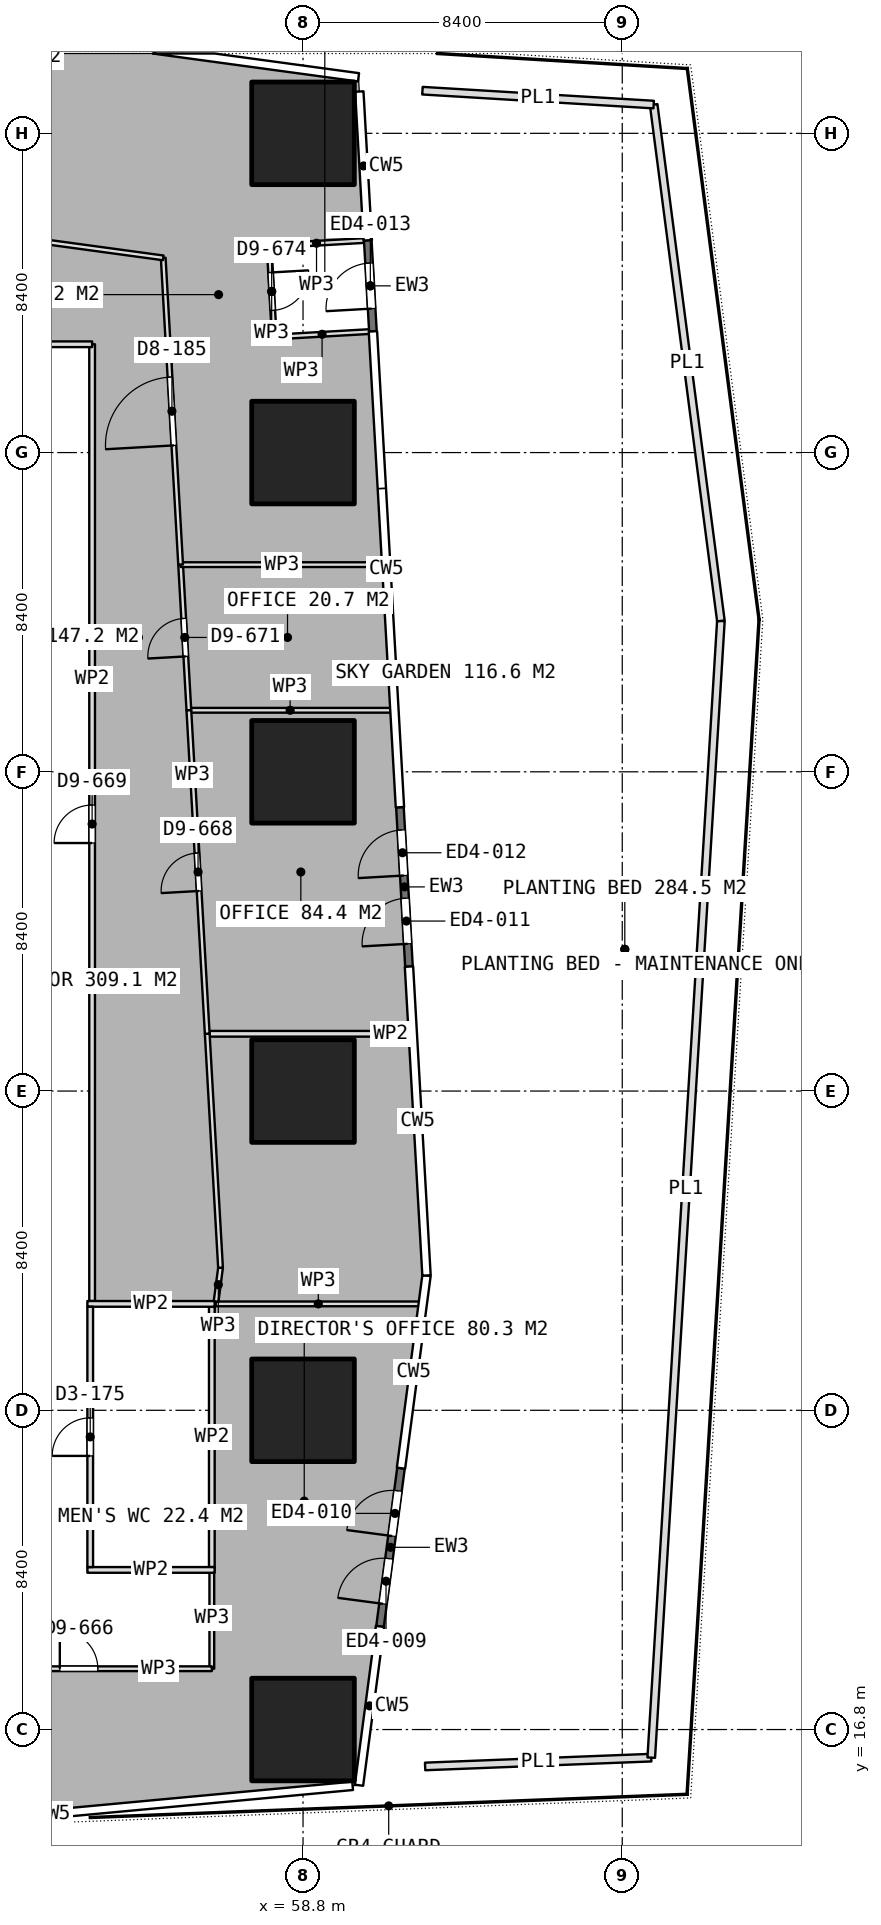
"""IFC4 building model, lengths in metres.
Left out: names, types, materials, properties, quantities, classifications, styles, units other than length and angle.
Written with IfcOpenShell. Run it as: python <this file> out.ifc"""

import sys

from ifc_helpers import new_model, si_unit, direction, frame, frame_2d, origin, origin_2d, place, context, subcontext, project, spatial, rectangle, extrude, element, fill, save


model = new_model("IFC4")
c1 = context("Model", 3, precision=1e-05, world=origin(), true_north=direction((0.0, 1.0)))
c2 = subcontext(c1, "Body", "Model", "MODEL_VIEW")
j1 = project(units=[si_unit("LENGTHUNIT", "METRE"), si_unit("PLANEANGLEUNIT", "RADIAN")], contexts=[c1])
p1 = place(None, origin())
s1 = spatial("IfcSite", under=j1, at=p1, CompositionType="ELEMENT")
p2 = place(p1, origin())
s2 = spatial("IfcBuilding", under=s1, at=p2, CompositionType="ELEMENT")
p3 = place(p2, frame((0.0, 0.0, 168.2)))
s3 = spatial("IfcBuildingStorey", under=s2, at=p3, CompositionType="ELEMENT", Elevation=168.2)
for number, where, z_axis, x_axis in (
    (1, (58.8, 16.8, 0.0), (0.0, 0.0, 1.0), (1.0, 0.0, 0.0)),
    (2, (58.8, 25.2, 0.0), (0.0, 0.0, 1.0), (1.0, 0.0, 0.0)),
    (3, (58.8, 33.6, 0.0), (0.0, 0.0, 1.0), (1.0, 0.0, 0.0)),
    (4, (58.8, 42.0, 0.0), (0.0, 0.0, 1.0), (1.0, 0.0, 0.0)),
    (5, (58.8, 50.4, 0.0), (0.0, 0.0, 1.0), (1.0, 0.0, 0.0)),
    (6, (58.8, 58.8, 0.0), (0.0, 0.0, 1.0), (1.0, 0.0, 0.0)),
):
    element("IfcColumn", number, at=place(p3, frame(where, z_axis=z_axis, x_axis=x_axis)), inside=s3, PredefinedType="COLUMN", context=c2, shape_type="SweptSolid", body=[
        extrude(rectangle(XDim=2.7, YDim=2.7, at=origin_2d()), origin(), (0.0, 0.0, 1.0), 4.5),
    ])
p4 = place(p3, frame((60.826, 19.513, 0.0), z_axis=(0.0, 0.0, 1.0), x_axis=(0.131307007814, 0.991341752222, 0.0)))
e7 = element("IfcWall", 7, at=p4, inside=s3, PredefinedType="SOLIDWALL", context=c2, shape_type="SweptSolid", body=[
    extrude(rectangle(XDim=4.2, YDim=0.2, at=frame_2d((2.1, 0.0))), origin(), (0.0, 0.0, 1.0), 4.25),
])
p5 = place(p4, frame((0.6, 0.0, 0.0)))
e8 = element("IfcOpeningElement", 8, at=p5, cuts=e7, PredefinedType="OPENING", context=c2, shape_type="SweptSolid", body=[
    extrude(rectangle(XDim=1.2, YDim=2.4, at=frame_2d((0.6, 1.2))), frame((0.0, 0.11, 0.0), z_axis=(0.0, -1.0, 0.0), x_axis=(1.0, 0.0, 0.0)), (0.0, 0.0, 1.0), 0.22),
])
p6 = place(p4, frame((2.4, 0.0, 0.0)))
e9 = element("IfcOpeningElement", 9, at=p6, cuts=e7, PredefinedType="OPENING", context=c2, shape_type="SweptSolid", body=[
    extrude(rectangle(XDim=1.2, YDim=2.4, at=frame_2d((0.6, 1.2))), frame((0.0, 0.11, 0.0), z_axis=(0.0, -1.0, 0.0), x_axis=(1.0, 0.0, 0.0)), (0.0, 0.0, 1.0), 0.22),
])
p7 = place(p3, frame((61.588, 36.875, 0.0), z_axis=(0.0, 0.0, 1.0), x_axis=(-0.056674017107, 0.998392736244, 0.0)))
e10 = element("IfcWall", 10, at=p7, inside=s3, PredefinedType="SOLIDWALL", context=c2, shape_type="SweptSolid", body=[
    extrude(rectangle(XDim=4.2, YDim=0.2, at=frame_2d((2.1, 0.0))), origin(), (0.0, 0.0, 1.0), 4.25),
])
p8 = place(p7, frame((0.6, 0.0, 0.0)))
e11 = element("IfcOpeningElement", 11, at=p8, cuts=e10, PredefinedType="OPENING", context=c2, shape_type="SweptSolid", body=[
    extrude(rectangle(XDim=1.2, YDim=2.4, at=frame_2d((0.6, 1.2))), frame((0.0, 0.11, 0.0), z_axis=(0.0, -1.0, 0.0), x_axis=(1.0, 0.0, 0.0)), (0.0, 0.0, 1.0), 0.22),
])
p9 = place(p7, frame((2.4, 0.0, 0.0)))
e12 = element("IfcOpeningElement", 12, at=p9, cuts=e10, PredefinedType="OPENING", context=c2, shape_type="SweptSolid", body=[
    extrude(rectangle(XDim=1.2, YDim=2.4, at=frame_2d((0.6, 1.2))), frame((0.0, 0.11, 0.0), z_axis=(0.0, -1.0, 0.0), x_axis=(1.0, 0.0, 0.0)), (0.0, 0.0, 1.0), 0.22),
])
p10 = place(p3, frame((60.639, 53.589, 0.0), z_axis=(0.0, 0.0, 1.0), x_axis=(-0.056658709935, 0.998393605042, 0.0)))
e13 = element("IfcWall", 13, at=p10, inside=s3, PredefinedType="SOLIDWALL", context=c2, shape_type="SweptSolid", body=[
    extrude(rectangle(XDim=2.4, YDim=0.2, at=frame_2d((1.2, 0.0))), origin(), (0.0, 0.0, 1.0), 4.25),
])
p11 = place(p10, frame((0.6, 0.0, 0.0)))
e14 = element("IfcOpeningElement", 14, at=p11, cuts=e13, PredefinedType="OPENING", context=c2, shape_type="SweptSolid", body=[
    extrude(rectangle(XDim=1.2, YDim=2.4, at=frame_2d((0.6, 1.2))), frame((0.0, 0.11, 0.0), z_axis=(0.0, -1.0, 0.0), x_axis=(1.0, 0.0, 0.0)), (0.0, 0.0, 1.0), 0.22),
])
p12 = place(p3, frame((62.013, 15.829, 0.0), z_axis=(0.0, 0.0, 1.0), x_axis=(0.999242772143, 0.038908640685, 0.0)))
e15 = element("IfcWall", 15, at=p12, inside=s3, PredefinedType="USERDEFINED", context=c2, shape_type="SweptSolid", body=[
    extrude(rectangle(XDim=5.955, YDim=0.2, at=frame_2d((2.977, 0.0))), origin(), (0.0, 0.0, 1.0), 0.6),
])
p13 = place(p3, frame((67.963, 16.061, 0.0), z_axis=(0.0, 0.0, 1.0), x_axis=(0.061161911914, 0.998127857807, 0.0)))
e16 = element("IfcWall", 16, at=p13, inside=s3, PredefinedType="USERDEFINED", context=c2, shape_type="SweptSolid", body=[
    extrude(rectangle(XDim=29.966, YDim=0.2, at=frame_2d((14.983, 0.0))), origin(), (0.0, 0.0, 1.0), 0.6),
])
p14 = place(p3, frame((69.796, 45.97, 0.0), z_axis=(0.0, 0.0, 1.0), x_axis=(-0.129119022458, 0.991629103062, 0.0)))
e17 = element("IfcWall", 17, at=p14, inside=s3, PredefinedType="USERDEFINED", context=c2, shape_type="SweptSolid", body=[
    extrude(rectangle(XDim=13.701, YDim=0.2, at=frame_2d((6.851, 0.0))), origin(), (0.0, 0.0, 1.0), 0.6),
])
p15 = place(p3, frame((68.027, 59.556, 0.0), z_axis=(0.0, 0.0, 1.0), x_axis=(-0.998198278136, 0.060001646027, 0.0)))
e18 = element("IfcWall", 18, at=p15, inside=s3, PredefinedType="USERDEFINED", context=c2, shape_type="SweptSolid", body=[
    extrude(rectangle(XDim=6.095, YDim=0.2, at=frame_2d((3.048, 0.0))), origin(), (0.0, 0.0, 1.0), 0.6),
])
for number, where, z_axis, x_axis in (
    (19, (53.125, 21.0, 0.0), (0.0, 0.0, 1.0), (1.0, 0.0, 0.0)),
    (20, (53.125, 28.0, 0.0), (0.0, 0.0, 1.0), (1.0, 0.0, 0.0)),
):
    element("IfcWall", number, at=place(p3, frame(where, z_axis=z_axis, x_axis=x_axis)), inside=s3, PredefinedType="PARTITIONING", context=c2, shape_type="SweptSolid", body=[
        extrude(rectangle(XDim=3.35, YDim=0.15, at=frame_2d((1.675, 0.0))), origin(), (0.0, 0.0, 1.0), 4.25),
    ])
p16 = place(p3, frame((53.2, 21.075, 0.0), z_axis=(0.0, 0.0, 1.0), x_axis=(0.0, 1.0, 0.0)))
e21 = element("IfcWall", 21, at=p16, inside=s3, PredefinedType="PARTITIONING", context=c2, shape_type="SweptSolid", body=[
    extrude(rectangle(XDim=6.85, YDim=0.15, at=frame_2d((3.425, 0.0))), origin(), (0.0, 0.0, 1.0), 4.25),
])
p17 = place(p16, frame((2.925, 0.0, 0.0)))
e22 = element("IfcOpeningElement", 22, at=p17, cuts=e21, PredefinedType="OPENING", context=c2, shape_type="SweptSolid", body=[
    extrude(rectangle(XDim=1.0, YDim=2.1, at=frame_2d((0.5, 1.05))), frame((0.0, 0.085, 0.0), z_axis=(0.0, -1.0, 0.0), x_axis=(1.0, 0.0, 0.0)), (0.0, 0.0, 1.0), 0.17),
])
p18 = place(p3, frame((56.4, 21.075, 0.0), z_axis=(0.0, 0.0, 1.0), x_axis=(0.0, 1.0, 0.0)))
e23 = element("IfcWall", 23, at=p18, inside=s3, PredefinedType="PARTITIONING", context=c2, shape_type="SweptSolid", body=[
    extrude(rectangle(XDim=6.85, YDim=0.15, at=frame_2d((3.425, 0.0))), origin(), (0.0, 0.0, 1.0), 4.25),
])
p19 = place(p3, frame((56.4, 18.4, 0.0), z_axis=(0.0, 0.0, 1.0), x_axis=(0.0, 1.0, 0.0)))
e24 = element("IfcWall", 24, at=p19, inside=s3, PredefinedType="PARTITIONING", context=c2, shape_type="SweptSolid", body=[
    extrude(rectangle(XDim=2.675, YDim=0.125, at=frame_2d((1.337, 0.0))), origin(), (0.0, 0.0, 1.0), 4.25),
])
p20 = place(p3, frame((56.503, 28.0, 0.0), z_axis=(0.0, 0.0, 1.0), x_axis=(1.0, 0.0, 0.0)))
e25 = element("IfcWall", 25, at=p20, inside=s3, PredefinedType="PARTITIONING", context=c2, shape_type="SweptSolid", body=[
    extrude(rectangle(XDim=5.397, YDim=0.125, at=frame_2d((2.698, 0.0))), origin(), (0.0, 0.0, 1.0), 4.25),
])
p21 = place(p3, frame((49.4, 18.4, 0.0), z_axis=(0.0, 0.0, 1.0), x_axis=(1.0, 0.0, 0.0)))
e26 = element("IfcWall", 26, at=p21, inside=s3, PredefinedType="PARTITIONING", context=c2, shape_type="SweptSolid", body=[
    extrude(rectangle(XDim=7.0, YDim=0.125, at=frame_2d((3.5, 0.0))), origin(), (0.0, 0.0, 1.0), 4.25),
])
p22 = place(p21, frame((3.0, 0.0, 0.0)))
e27 = element("IfcOpeningElement", 27, at=p22, cuts=e26, PredefinedType="OPENING", context=c2, shape_type="SweptSolid", body=[
    extrude(rectangle(XDim=1.0, YDim=2.1, at=frame_2d((0.5, 1.05))), frame((0.0, 0.073, 0.0), z_axis=(0.0, -1.0, 0.0), x_axis=(1.0, 0.0, 0.0)), (0.0, 0.0, 1.0), 0.145),
])
p23 = place(p3, frame((56.512, 28.062, 0.0), z_axis=(0.0, 0.0, 1.0), x_axis=(0.130433380751, 0.991457075816, 0.0)))
e28 = element("IfcWall", 28, at=p23, inside=s3, PredefinedType="PARTITIONING", context=c2, shape_type="SweptSolid", body=[
    extrude(rectangle(XDim=0.896, YDim=0.125, at=frame_2d((0.448, 0.0))), origin(), (0.0, 0.0, 1.0), 4.25),
])
p24 = place(p3, frame((56.629, 28.951, 0.0), z_axis=(0.0, 0.0, 1.0), x_axis=(-0.056721758154, 0.998390025066, 0.0)))
e29 = element("IfcWall", 29, at=p24, inside=s3, PredefinedType="PARTITIONING", context=c2, shape_type="SweptSolid", body=[
    extrude(rectangle(XDim=6.168, YDim=0.125, at=frame_2d((3.084, 0.0))), origin(), (0.0, 0.0, 1.0), 4.25),
])
p25 = place(p3, frame((56.279, 35.109, 0.0), z_axis=(0.0, 0.0, 1.0), x_axis=(-0.056683540039, 0.998392195627, 0.0)))
e30 = element("IfcWall", 30, at=p25, inside=s3, PredefinedType="PARTITIONING", context=c2, shape_type="SweptSolid", body=[
    extrude(rectangle(XDim=8.524, YDim=0.125, at=frame_2d((4.262, 0.0))), origin(), (0.0, 0.0, 1.0), 4.25),
])
p26 = place(p25, frame((3.762, 0.0, 0.0)))
e31 = element("IfcOpeningElement", 31, at=p26, cuts=e30, PredefinedType="OPENING", context=c2, shape_type="SweptSolid", body=[
    extrude(rectangle(XDim=1.0, YDim=2.1, at=frame_2d((0.5, 1.05))), frame((0.0, 0.073, 0.0), z_axis=(0.0, -1.0, 0.0), x_axis=(1.0, 0.0, 0.0)), (0.0, 0.0, 1.0), 0.145),
])
p27 = place(p3, frame((55.796, 43.619, 0.0), z_axis=(0.0, 0.0, 1.0), x_axis=(1.0, 0.0, 0.0)))
e32 = element("IfcWall", 32, at=p27, inside=s3, PredefinedType="PARTITIONING", context=c2, shape_type="SweptSolid", body=[
    extrude(rectangle(XDim=5.329, YDim=0.125, at=frame_2d((2.665, 0.0))), origin(), (0.0, 0.0, 1.0), 4.25),
])
p28 = place(p3, frame((55.796, 43.62, 0.0), z_axis=(0.0, 0.0, 1.0), x_axis=(-0.056502541605, 0.998402455322, 0.0)))
e33 = element("IfcWall", 33, at=p28, inside=s3, PredefinedType="PARTITIONING", context=c2, shape_type="SweptSolid", body=[
    extrude(rectangle(XDim=3.837, YDim=0.125, at=frame_2d((1.918, 0.0))), origin(), (0.0, 0.0, 1.0), 4.25),
])
p29 = place(p28, frame((1.419, 0.0, 0.0)))
e34 = element("IfcOpeningElement", 34, at=p29, cuts=e33, PredefinedType="OPENING", context=c2, shape_type="SweptSolid", body=[
    extrude(rectangle(XDim=1.0, YDim=2.1, at=frame_2d((0.5, 1.05))), frame((0.0, 0.073, 0.0), z_axis=(0.0, -1.0, 0.0), x_axis=(1.0, 0.0, 0.0)), (0.0, 0.0, 1.0), 0.145),
])
p30 = place(p3, frame((55.579, 47.451, 0.0), z_axis=(0.0, 0.0, 1.0), x_axis=(1.0, 0.0, 0.0)))
e35 = element("IfcWall", 35, at=p30, inside=s3, PredefinedType="PARTITIONING", context=c2, shape_type="SweptSolid", body=[
    extrude(rectangle(XDim=5.329, YDim=0.125, at=frame_2d((2.665, 0.0))), origin(), (0.0, 0.0, 1.0), 4.25),
])
p31 = place(p3, frame((60.403, 55.979, 0.0), z_axis=(0.0, 0.0, 1.0), x_axis=(-0.99838370594, -0.056832875279, 0.0)))
e36 = element("IfcWall", 36, at=p31, inside=s3, PredefinedType="PARTITIONING", context=c2, shape_type="SweptSolid", body=[
    extrude(rectangle(XDim=2.5, YDim=0.125, at=frame_2d((1.25, 0.0))), origin(), (0.0, 0.0, 1.0), 4.25),
])
p32 = place(p3, frame((57.907, 55.837, 0.0), z_axis=(0.0, 0.0, 1.0), x_axis=(0.056664464652, -0.998393278446, 0.0)))
e37 = element("IfcWall", 37, at=p32, inside=s3, PredefinedType="PARTITIONING", context=c2, shape_type="SweptSolid", body=[
    extrude(rectangle(XDim=2.4, YDim=0.125, at=frame_2d((1.2, 0.0))), origin(), (0.0, 0.0, 1.0), 4.25),
])
p33 = place(p32, frame((0.7, 0.0, 0.0)))
e38 = element("IfcOpeningElement", 38, at=p33, cuts=e37, PredefinedType="OPENING", context=c2, shape_type="SweptSolid", body=[
    extrude(rectangle(XDim=1.0, YDim=2.1, at=frame_2d((0.5, 1.05))), frame((0.0, 0.073, 0.0), z_axis=(0.0, -1.0, 0.0), x_axis=(1.0, 0.0, 0.0)), (0.0, 0.0, 1.0), 0.145),
])
p34 = place(p3, frame((58.043, 53.441, 0.0), z_axis=(0.0, 0.0, 1.0), x_axis=(0.99838737481, 0.056768387506, 0.0)))
e39 = element("IfcWall", 39, at=p34, inside=s3, PredefinedType="PARTITIONING", context=c2, shape_type="SweptSolid", body=[
    extrude(rectangle(XDim=2.52, YDim=0.125, at=frame_2d((1.26, 0.0))), origin(), (0.0, 0.0, 1.0), 4.25),
])
p35 = place(p3, frame((55.579, 47.452, 0.0), z_axis=(0.0, 0.0, 1.0), x_axis=(-0.056655879017, 0.998393765692, 0.0)))
e40 = element("IfcWall", 40, at=p35, inside=s3, PredefinedType="PARTITIONING", context=c2, shape_type="SweptSolid", body=[
    extrude(rectangle(XDim=8.084, YDim=0.125, at=frame_2d((4.042, 0.0))), origin(), (0.0, 0.0, 1.0), 4.25),
])
p36 = place(p35, frame((3.142, 0.0, 0.0)))
e41 = element("IfcOpeningElement", 41, at=p36, cuts=e40, PredefinedType="OPENING", context=c2, shape_type="SweptSolid", body=[
    extrude(rectangle(XDim=1.8, YDim=2.1, at=frame_2d((0.9, 1.05))), frame((0.0, 0.073, 0.0), z_axis=(0.0, -1.0, 0.0), x_axis=(1.0, 0.0, 0.0)), (0.0, 0.0, 1.0), 0.145),
])
p37 = place(p3, frame((55.121, 55.523, 0.0), z_axis=(0.0, 0.0, 1.0), x_axis=(-0.990861978698, 0.134879721126, 0.0)))
e42 = element("IfcWall", 42, at=p37, inside=s3, PredefinedType="PARTITIONING", context=c2, shape_type="SweptSolid", body=[
    extrude(rectangle(XDim=3.173, YDim=0.125, at=frame_2d((1.586, 0.0))), origin(), (0.0, 0.0, 1.0), 4.25),
])
p38 = place(p3, frame((56.342, 35.107, 0.0), z_axis=(0.0, 0.0, 1.0), x_axis=(1.0, 0.0, 0.0)))
e43 = element("IfcWall", 43, at=p38, inside=s3, PredefinedType="PARTITIONING", context=c2, shape_type="SweptSolid", body=[
    extrude(rectangle(XDim=5.296, YDim=0.15, at=frame_2d((2.648, 0.0))), origin(), (0.0, 0.0, 1.0), 4.25),
])
p39 = place(p3, frame((53.25, 28.075, 0.0), z_axis=(0.0, 0.0, 1.0), x_axis=(0.0, 1.0, 0.0)))
e44 = element("IfcWall", 44, at=p39, inside=s3, PredefinedType="PARTITIONING", context=c2, shape_type="SweptSolid", body=[
    extrude(rectangle(XDim=25.175, YDim=0.15, at=frame_2d((12.587, 0.0))), origin(), (0.0, 0.0, 1.0), 4.25),
])
p40 = place(p39, frame((12.051, 0.0, 0.0)))
e45 = element("IfcOpeningElement", 45, at=p40, cuts=e44, PredefinedType="OPENING", context=c2, shape_type="SweptSolid", body=[
    extrude(rectangle(XDim=1.0, YDim=2.1, at=frame_2d((0.5, 1.05))), frame((0.0, 0.085, 0.0), z_axis=(0.0, -1.0, 0.0), x_axis=(1.0, 0.0, 0.0)), (0.0, 0.0, 1.0), 0.17),
])
p41 = place(p3, frame((53.25, 53.25, 0.0), z_axis=(0.0, 0.0, 1.0), x_axis=(-1.0, 0.0, 0.0)))
e46 = element("IfcWall", 46, at=p41, inside=s3, PredefinedType="PARTITIONING", context=c2, shape_type="SweptSolid", body=[
    extrude(rectangle(XDim=24.248, YDim=0.15, at=frame_2d((12.124, 0.0))), origin(), (0.0, 0.0, 1.0), 4.25),
])
p42 = place(p5, origin())
e47 = element("IfcDoor", 47, at=p42, inside=s3, OperationType="SINGLE_SWING_LEFT", PredefinedType="DOOR", context=c2, shape_type="SweptSolid", body=[
    extrude(rectangle(XDim=1.2, YDim=2.4, at=frame_2d((0.6, 1.2))), frame((0.0, 0.025, 0.0), z_axis=(0.0, -1.0, 0.0), x_axis=(1.0, 0.0, 0.0)), (0.0, 0.0, 1.0), 0.05),
])
fill(e8, e47)
p43 = place(p6, origin())
e48 = element("IfcDoor", 48, at=p43, inside=s3, OperationType="SINGLE_SWING_LEFT", PredefinedType="DOOR", context=c2, shape_type="SweptSolid", body=[
    extrude(rectangle(XDim=1.2, YDim=2.4, at=frame_2d((0.6, 1.2))), frame((0.0, 0.025, 0.0), z_axis=(0.0, -1.0, 0.0), x_axis=(1.0, 0.0, 0.0)), (0.0, 0.0, 1.0), 0.05),
])
fill(e9, e48)
p44 = place(p8, origin())
e49 = element("IfcDoor", 49, at=p44, inside=s3, OperationType="SINGLE_SWING_LEFT", PredefinedType="DOOR", context=c2, shape_type="SweptSolid", body=[
    extrude(rectangle(XDim=1.2, YDim=2.4, at=frame_2d((0.6, 1.2))), frame((0.0, 0.025, 0.0), z_axis=(0.0, -1.0, 0.0), x_axis=(1.0, 0.0, 0.0)), (0.0, 0.0, 1.0), 0.05),
])
fill(e11, e49)
p45 = place(p9, origin())
e50 = element("IfcDoor", 50, at=p45, inside=s3, OperationType="SINGLE_SWING_LEFT", PredefinedType="DOOR", context=c2, shape_type="SweptSolid", body=[
    extrude(rectangle(XDim=1.2, YDim=2.4, at=frame_2d((0.6, 1.2))), frame((0.0, 0.025, 0.0), z_axis=(0.0, -1.0, 0.0), x_axis=(1.0, 0.0, 0.0)), (0.0, 0.0, 1.0), 0.05),
])
fill(e12, e50)
p46 = place(p11, origin())
e51 = element("IfcDoor", 51, at=p46, inside=s3, OperationType="SINGLE_SWING_LEFT", PredefinedType="DOOR", context=c2, shape_type="SweptSolid", body=[
    extrude(rectangle(XDim=1.2, YDim=2.4, at=frame_2d((0.6, 1.2))), frame((0.0, 0.025, 0.0), z_axis=(0.0, -1.0, 0.0), x_axis=(1.0, 0.0, 0.0)), (0.0, 0.0, 1.0), 0.05),
])
fill(e14, e51)
p47 = place(p17, origin())
e52 = element("IfcDoor", 52, at=p47, inside=s3, OperationType="SINGLE_SWING_LEFT", PredefinedType="DOOR", context=c2, shape_type="SweptSolid", body=[
    extrude(rectangle(XDim=1.0, YDim=2.1, at=frame_2d((0.5, 1.05))), frame((0.0, 0.025, 0.0), z_axis=(0.0, -1.0, 0.0), x_axis=(1.0, 0.0, 0.0)), (0.0, 0.0, 1.0), 0.05),
])
fill(e22, e52)
p48 = place(p22, origin())
e53 = element("IfcDoor", 53, at=p48, inside=s3, OperationType="SINGLE_SWING_LEFT", PredefinedType="DOOR", context=c2, shape_type="SweptSolid", body=[
    extrude(rectangle(XDim=1.0, YDim=2.1, at=frame_2d((0.5, 1.05))), frame((0.0, 0.025, 0.0), z_axis=(0.0, -1.0, 0.0), x_axis=(1.0, 0.0, 0.0)), (0.0, 0.0, 1.0), 0.05),
])
fill(e27, e53)
p49 = place(p26, origin())
e54 = element("IfcDoor", 54, at=p49, inside=s3, OperationType="SINGLE_SWING_LEFT", PredefinedType="DOOR", context=c2, shape_type="SweptSolid", body=[
    extrude(rectangle(XDim=1.0, YDim=2.1, at=frame_2d((0.5, 1.05))), frame((0.0, 0.025, 0.0), z_axis=(0.0, -1.0, 0.0), x_axis=(1.0, 0.0, 0.0)), (0.0, 0.0, 1.0), 0.05),
])
fill(e31, e54)
p50 = place(p29, origin())
e55 = element("IfcDoor", 55, at=p50, inside=s3, OperationType="SINGLE_SWING_LEFT", PredefinedType="DOOR", context=c2, shape_type="SweptSolid", body=[
    extrude(rectangle(XDim=1.0, YDim=2.1, at=frame_2d((0.5, 1.05))), frame((0.0, 0.025, 0.0), z_axis=(0.0, -1.0, 0.0), x_axis=(1.0, 0.0, 0.0)), (0.0, 0.0, 1.0), 0.05),
])
fill(e34, e55)
p51 = place(p36, origin())
e56 = element("IfcDoor", 56, at=p51, inside=s3, OperationType="DOUBLE_DOOR_SINGLE_SWING", PredefinedType="DOOR", context=c2, shape_type="SweptSolid", body=[
    extrude(rectangle(XDim=1.8, YDim=2.1, at=frame_2d((0.9, 1.05))), frame((0.0, 0.025, 0.0), z_axis=(0.0, -1.0, 0.0), x_axis=(1.0, 0.0, 0.0)), (0.0, 0.0, 1.0), 0.05),
])
fill(e41, e56)
p52 = place(p40, origin())
e57 = element("IfcDoor", 57, at=p52, inside=s3, OperationType="SINGLE_SWING_LEFT", PredefinedType="DOOR", context=c2, shape_type="SweptSolid", body=[
    extrude(rectangle(XDim=1.0, YDim=2.1, at=frame_2d((0.5, 1.05))), frame((0.0, 0.025, 0.0), z_axis=(0.0, -1.0, 0.0), x_axis=(1.0, 0.0, 0.0)), (0.0, 0.0, 1.0), 0.05),
])
fill(e45, e57)
p53 = place(p33, origin())
e58 = element("IfcDoor", 58, at=p53, inside=s3, OperationType="SINGLE_SWING_LEFT", PredefinedType="DOOR", context=c2, shape_type="SweptSolid", body=[
    extrude(rectangle(XDim=1.0, YDim=2.1, at=frame_2d((0.5, 1.05))), frame((0.0, 0.025, 0.0), z_axis=(0.0, -1.0, 0.0), x_axis=(1.0, 0.0, 0.0)), (0.0, 0.0, 1.0), 0.05),
])
fill(e38, e58)
save(model, sys.argv[1])
